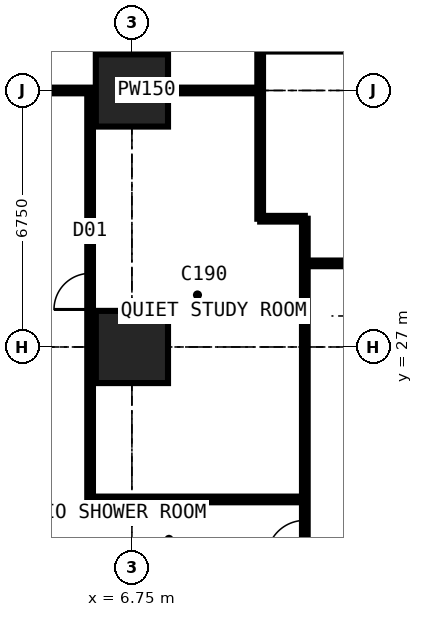
"""IFC4 building model, lengths in metres.
Left out: names, types, materials, properties, quantities, classifications, styles, units other than length and angle.
Written with IfcOpenShell. Run it as: python <this file> out.ifc"""

import sys

from ifc_helpers import new_model, si_unit, direction, frame, frame_2d, origin, origin_2d, place, context, subcontext, project, spatial, rectangle, extrude, element, fill, save


model = new_model("IFC4")
c1 = context("Model", 3, precision=1e-05, world=origin(), true_north=direction((0.0, 1.0)))
c2 = subcontext(c1, "Body", "Model", "MODEL_VIEW")
j1 = project(units=[si_unit("LENGTHUNIT", "METRE"), si_unit("PLANEANGLEUNIT", "RADIAN")], contexts=[c1])
p1 = place(None, origin())
s1 = spatial("IfcSite", under=j1, at=p1, CompositionType="ELEMENT")
p2 = place(p1, origin())
s2 = spatial("IfcBuilding", under=s1, at=p2, CompositionType="ELEMENT")
p3 = place(p2, frame((0.0, 0.0, 36.0)))
s3 = spatial("IfcBuildingStorey", under=s2, at=p3, CompositionType="ELEMENT", Elevation=36.0)
for number, where, z_axis, x_axis in (
    (1, (6.75, 27.0, 0.0), (0.0, 0.0, 1.0), (1.0, 0.0, 0.0)),
    (2, (6.75, 33.75, 0.0), (0.0, 0.0, 1.0), (1.0, 0.0, 0.0)),
):
    element("IfcColumn", number, at=place(p3, frame(where, z_axis=z_axis, x_axis=x_axis)), inside=s3, PredefinedType="COLUMN", context=c2, shape_type="SweptSolid", body=[
        extrude(rectangle(XDim=1.9, YDim=1.9, at=origin_2d()), origin(), (0.0, 0.0, 1.0), 3.6),
    ])
p4 = place(p3, frame((4.15, 33.75, 0.0), z_axis=(0.0, 0.0, 1.0), x_axis=(1.0, 0.0, 0.0)))
e3 = element("IfcWall", 3, at=p4, inside=s3, PredefinedType="PARTITIONING", context=c2, shape_type="SweptSolid", body=[
    extrude(rectangle(XDim=5.975, YDim=0.15, at=frame_2d((2.988, 0.0))), origin(), (0.0, 0.0, 1.0), 2.877),
])
p5 = place(p3, frame((5.65, 22.988, 0.0), z_axis=(0.0, 0.0, 1.0), x_axis=(0.0, 1.0, 0.0)))
e4 = element("IfcWall", 4, at=p5, inside=s3, PredefinedType="PARTITIONING", context=c2, shape_type="SweptSolid", body=[
    extrude(rectangle(XDim=10.762, YDim=0.15, at=frame_2d((5.381, 0.0))), origin(), (0.0, 0.0, 1.0), 3.375),
])
p6 = place(p5, frame((5.0, 0.0, 0.0)))
e5 = element("IfcOpeningElement", 5, at=p6, cuts=e4, PredefinedType="OPENING", context=c2, shape_type="SweptSolid", body=[
    extrude(rectangle(XDim=0.95, YDim=2.2, at=frame_2d((0.475, 1.1))), frame((0.0, 0.085, 0.0), z_axis=(0.0, -1.0, 0.0), x_axis=(1.0, 0.0, 0.0)), (0.0, 0.0, 1.0), 0.17),
])
p7 = place(p3, frame((5.65, 22.988, 0.0), z_axis=(0.0, 0.0, 1.0), x_axis=(1.0, 0.0, 0.0)))
e6 = element("IfcWall", 6, at=p7, inside=s3, PredefinedType="PARTITIONING", context=c2, shape_type="SweptSolid", body=[
    extrude(rectangle(XDim=5.65, YDim=0.15, at=frame_2d((2.825, 0.0))), origin(), (0.0, 0.0, 1.0), 3.375),
])
p8 = place(p3, frame((10.125, 30.375, 0.0), z_axis=(0.0, 0.0, 1.0), x_axis=(0.0, 1.0, 0.0)))
e7 = element("IfcWall", 7, at=p8, inside=s3, PredefinedType="PARTITIONING", context=c2, shape_type="SweptSolid", body=[
    extrude(rectangle(XDim=10.859, YDim=0.15, at=frame_2d((5.429, 0.0))), origin(), (0.0, 0.0, 1.0), 3.375),
])
p9 = place(p8, frame((4.725, 0.0, 0.0)))
e8 = element("IfcOpeningElement", 8, at=p9, cuts=e7, PredefinedType="OPENING", context=c2, shape_type="SweptSolid", body=[
    extrude(rectangle(XDim=1.0, YDim=2.2, at=frame_2d((0.5, 1.1))), frame((0.0, 0.085, 0.0), z_axis=(0.0, -1.0, 0.0), x_axis=(1.0, 0.0, 0.0)), (0.0, 0.0, 1.0), 0.17),
])
p10 = place(p3, frame((10.125, 30.375, 0.0), z_axis=(0.0, 0.0, 1.0), x_axis=(1.0, 0.0, 0.0)))
e9 = element("IfcWall", 9, at=p10, inside=s3, PredefinedType="PARTITIONING", context=c2, shape_type="SweptSolid", body=[
    extrude(rectangle(XDim=1.175, YDim=0.15, at=frame_2d((0.587, 0.0))), origin(), (0.0, 0.0, 1.0), 3.375),
])
p11 = place(p3, frame((11.3, 11.3, 0.0), z_axis=(0.0, 0.0, 1.0), x_axis=(0.0, 1.0, 0.0)))
e10 = element("IfcWall", 10, at=p11, inside=s3, PredefinedType="PARTITIONING", context=c2, shape_type="SweptSolid", body=[
    extrude(rectangle(XDim=19.075, YDim=0.15, at=frame_2d((9.538, 0.0))), origin(), (0.0, 0.0, 1.0), 3.375),
])
p12 = place(p11, frame((10.137, 0.0, 0.0)))
e11 = element("IfcOpeningElement", 11, at=p12, cuts=e10, PredefinedType="OPENING", context=c2, shape_type="SweptSolid", body=[
    extrude(rectangle(XDim=1.0, YDim=2.2, at=frame_2d((0.5, 1.1))), frame((0.0, 0.085, 0.0), z_axis=(0.0, -1.0, 0.0), x_axis=(1.0, 0.0, 0.0)), (0.0, 0.0, 1.0), 0.17),
])
p13 = place(p3, frame((11.3, 29.2, 0.0), z_axis=(0.0, 0.0, 1.0), x_axis=(1.0, 0.0, 0.0)))
e12 = element("IfcWall", 12, at=p13, inside=s3, PredefinedType="PARTITIONING", context=c2, shape_type="SweptSolid", body=[
    extrude(rectangle(XDim=19.075, YDim=0.15, at=frame_2d((9.538, 0.0))), origin(), (0.0, 0.0, 1.0), 3.375),
])
p14 = place(p13, frame((12.875, 0.0, 0.0)))
e13 = element("IfcOpeningElement", 13, at=p14, cuts=e12, PredefinedType="OPENING", context=c2, shape_type="SweptSolid", body=[
    extrude(rectangle(XDim=1.0, YDim=2.2, at=frame_2d((0.5, 1.1))), frame((0.0, 0.085, 0.0), z_axis=(0.0, -1.0, 0.0), x_axis=(1.0, 0.0, 0.0)), (0.0, 0.0, 1.0), 0.17),
])
p15 = place(p13, frame((10.438, 0.0, 0.0)))
e14 = element("IfcOpeningElement", 14, at=p15, cuts=e12, PredefinedType="OPENING", context=c2, shape_type="SweptSolid", body=[
    extrude(rectangle(XDim=1.0, YDim=2.2, at=frame_2d((0.5, 1.1))), frame((0.0, 0.085, 0.0), z_axis=(0.0, -1.0, 0.0), x_axis=(1.0, 0.0, 0.0)), (0.0, 0.0, 1.0), 0.17),
])
p16 = place(p13, frame((14.875, 0.0, 0.0)))
e15 = element("IfcOpeningElement", 15, at=p16, cuts=e12, PredefinedType="OPENING", context=c2, shape_type="SweptSolid", body=[
    extrude(rectangle(XDim=0.95, YDim=2.2, at=frame_2d((0.475, 1.1))), frame((0.0, 0.085, 0.0), z_axis=(0.0, -1.0, 0.0), x_axis=(1.0, 0.0, 0.0)), (0.0, 0.0, 1.0), 0.17),
])
p17 = place(p12, origin())
e16 = element("IfcDoor", 16, at=p17, inside=s3, OperationType="SINGLE_SWING_LEFT", PredefinedType="DOOR", context=c2, shape_type="SweptSolid", body=[
    extrude(rectangle(XDim=1.0, YDim=2.2, at=frame_2d((0.5, 1.1))), frame((0.0, 0.025, 0.0), z_axis=(0.0, -1.0, 0.0), x_axis=(1.0, 0.0, 0.0)), (0.0, 0.0, 1.0), 0.05),
])
fill(e11, e16)
p18 = place(p6, origin())
e17 = element("IfcDoor", 17, at=p18, inside=s3, OperationType="SINGLE_SWING_LEFT", PredefinedType="DOOR", context=c2, shape_type="SweptSolid", body=[
    extrude(rectangle(XDim=0.95, YDim=2.2, at=frame_2d((0.475, 1.1))), frame((0.0, 0.025, 0.0), z_axis=(0.0, -1.0, 0.0), x_axis=(1.0, 0.0, 0.0)), (0.0, 0.0, 1.0), 0.05),
])
fill(e5, e17)
save(model, sys.argv[1])
